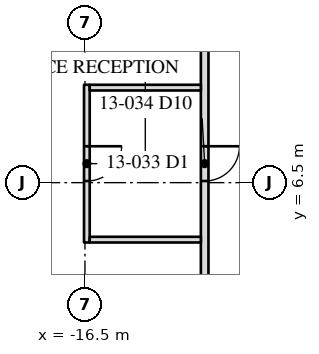
"""IFC4 building model, lengths in metres.
Left out: names, types, materials, properties, quantities, classifications, styles, units other than length and angle.
Written with IfcOpenShell. Run it as: python <this file> out.ifc"""

import sys

from ifc_helpers import new_model, si_unit, direction, frame, frame_2d, origin, place, context, subcontext, project, spatial, rectangle, extrude, element, fill, save


model = new_model("IFC4")
c1 = context("Model", 3, precision=1e-05, world=origin(), true_north=direction((0.0, 1.0)))
c2 = subcontext(c1, "Body", "Model", "MODEL_VIEW")
j1 = project(units=[si_unit("LENGTHUNIT", "METRE"), si_unit("PLANEANGLEUNIT", "RADIAN")], contexts=[c1])
p1 = place(None, origin())
s1 = spatial("IfcSite", under=j1, at=p1, CompositionType="ELEMENT")
p2 = place(p1, origin())
s2 = spatial("IfcBuilding", under=s1, at=p2, CompositionType="ELEMENT")
p3 = place(p2, frame((0.0, 0.0, 57.0)))
s3 = spatial("IfcBuildingStorey", under=s2, at=p3, CompositionType="ELEMENT", Elevation=57.0)
p4 = place(p3, frame((-13.35, 13.45, 0.0), z_axis=(0.0, 0.0, 1.0), x_axis=(0.0, -1.0, 0.0)))
e1 = element("IfcWall", 1, at=p4, inside=s3, PredefinedType="PARTITIONING", context=c2, shape_type="SweptSolid", body=[
    extrude(rectangle(XDim=26.7, YDim=0.2, at=frame_2d((13.35, 0.0))), origin(), (0.0, 0.0, 1.0), 3.91),
])
p5 = place(p4, frame((5.992, 0.0, 0.0)))
e2 = element("IfcOpeningElement", 2, at=p5, cuts=e1, PredefinedType="OPENING", context=c2, shape_type="SweptSolid", body=[
    extrude(rectangle(XDim=0.915, YDim=2.134, at=frame_2d((0.458, 1.067))), frame((0.0, 0.11, 0.0), z_axis=(0.0, -1.0, 0.0), x_axis=(1.0, 0.0, 0.0)), (0.0, 0.0, 1.0), 0.22),
])
p6 = place(p3, frame((-16.45, 9.075, 0.0), z_axis=(0.0, 0.0, 1.0), x_axis=(0.0, -1.0, 0.0)))
e3 = element("IfcWall", 3, at=p6, inside=s3, PredefinedType="PARTITIONING", context=c2, shape_type="SweptSolid", body=[
    extrude(rectangle(XDim=4.15, YDim=0.15, at=frame_2d((2.075, 0.0))), origin(), (0.0, 0.0, 1.0), 3.91),
])
p7 = place(p6, frame((1.617, 0.0, 0.0)))
e4 = element("IfcOpeningElement", 4, at=p7, cuts=e3, PredefinedType="OPENING", context=c2, shape_type="SweptSolid", body=[
    extrude(rectangle(XDim=0.915, YDim=2.134, at=frame_2d((0.458, 1.067))), frame((0.0, 0.085, 0.0), z_axis=(0.0, -1.0, 0.0), x_axis=(1.0, 0.0, 0.0)), (0.0, 0.0, 1.0), 0.17),
])
for number, where, z_axis, x_axis in (
    (5, (-16.375, 9.0, 0.0), (0.0, 0.0, 1.0), (1.0, 0.0, 0.0)),
    (6, (-16.375, 5.0, 0.0), (0.0, 0.0, 1.0), (1.0, 0.0, 0.0)),
):
    element("IfcWall", number, at=place(p3, frame(where, z_axis=z_axis, x_axis=x_axis)), inside=s3, PredefinedType="PARTITIONING", context=c2, shape_type="SweptSolid", body=[
        extrude(rectangle(XDim=2.925, YDim=0.15, at=frame_2d((1.462, 0.0))), origin(), (0.0, 0.0, 1.0), 3.91),
    ])
p8 = place(p7, origin())
e7 = element("IfcDoor", 7, at=p8, inside=s3, OperationType="SINGLE_SWING_LEFT", PredefinedType="DOOR", context=c2, shape_type="SweptSolid", body=[
    extrude(rectangle(XDim=0.915, YDim=2.134, at=frame_2d((0.458, 1.067))), frame((0.0, 0.025, 0.0), z_axis=(0.0, -1.0, 0.0), x_axis=(1.0, 0.0, 0.0)), (0.0, 0.0, 1.0), 0.05),
])
fill(e4, e7)
p9 = place(p5, origin())
e8 = element("IfcDoor", 8, at=p9, inside=s3, OperationType="SINGLE_SWING_LEFT", PredefinedType="DOOR", context=c2, shape_type="SweptSolid", body=[
    extrude(rectangle(XDim=0.915, YDim=2.134, at=frame_2d((0.458, 1.067))), frame((0.0, 0.025, 0.0), z_axis=(0.0, -1.0, 0.0), x_axis=(1.0, 0.0, 0.0)), (0.0, 0.0, 1.0), 0.05),
])
fill(e2, e8)
save(model, sys.argv[1])
